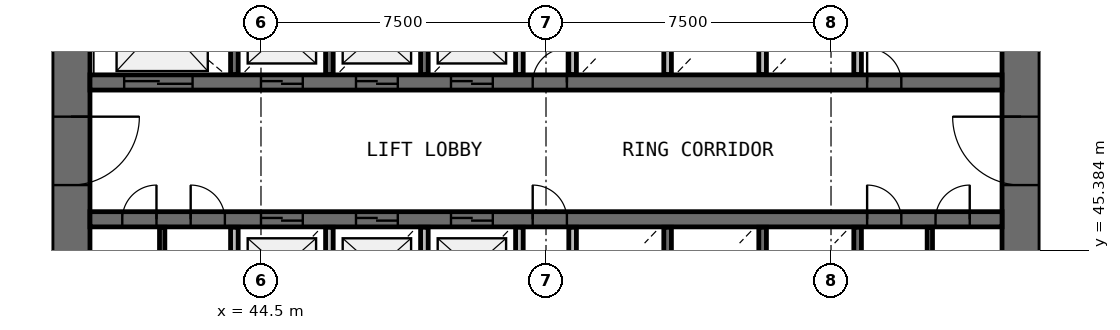
"""IFC4 building model, lengths in metres.
Left out: names, types, materials, properties, quantities, classifications, styles, units other than length and angle.
Written with IfcOpenShell. Run it as: python <this file> out.ifc"""

import sys

from ifc_helpers import new_model, si_unit, direction, frame, frame_2d, origin, place, context, subcontext, project, spatial, rectangle, extrude, source, transform, mapped, element, fill, save


model = new_model("IFC4")
c1 = context("Model", 3, precision=1e-05, world=origin(), true_north=direction((0.0, 1.0)))
c2 = subcontext(c1, "Body", "Model", "MODEL_VIEW")
j1 = project(units=[si_unit("LENGTHUNIT", "METRE"), si_unit("PLANEANGLEUNIT", "RADIAN")], contexts=[c1])
p1 = place(None, origin())
s1 = spatial("IfcSite", under=j1, at=p1, CompositionType="ELEMENT")
p2 = place(p1, origin())
s2 = spatial("IfcBuilding", under=s1, at=p2, CompositionType="ELEMENT")
p3 = place(p2, frame((0.0, 0.0, 31.4)))
s3 = spatial("IfcBuildingStorey", under=s2, at=p3, CompositionType="ELEMENT", Elevation=31.4)
p4 = place(p3, frame((64.5, 38.0, 0.0), z_axis=(0.0, 0.0, 1.0), x_axis=(0.0, 1.0, 0.0)))
e1 = element("IfcWall", 1, at=p4, inside=s3, PredefinedType="SHEAR", context=c2, shape_type="SweptSolid", body=[
    extrude(rectangle(XDim=20.0, YDim=1.0, at=frame_2d((10.0, 0.0))), origin(), (0.0, 0.0, 1.0), 4.4),
])
p5 = place(p4, frame((9.1, 0.0, 0.0)))
e2 = element("IfcOpeningElement", 2, at=p5, cuts=e1, PredefinedType="OPENING", context=c2, shape_type="SweptSolid", body=[
    extrude(rectangle(XDim=1.8, YDim=2.1, at=frame_2d((0.9, 1.05))), frame((0.0, 0.51, 0.0), z_axis=(0.0, -1.0, 0.0), x_axis=(1.0, 0.0, 0.0)), (0.0, 0.0, 1.0), 1.02),
])
p6 = place(p3, frame((39.5, 58.0, 0.0), z_axis=(0.0, 0.0, 1.0), x_axis=(0.0, -1.0, 0.0)))
e3 = element("IfcWall", 3, at=p6, inside=s3, PredefinedType="SHEAR", context=c2, shape_type="SweptSolid", body=[
    extrude(rectangle(XDim=20.0, YDim=1.0, at=frame_2d((10.0, 0.0))), origin(), (0.0, 0.0, 1.0), 4.4),
])
p7 = place(p6, frame((9.1, 0.0, 0.0)))
e4 = element("IfcOpeningElement", 4, at=p7, cuts=e3, PredefinedType="OPENING", context=c2, shape_type="SweptSolid", body=[
    extrude(rectangle(XDim=1.8, YDim=2.1, at=frame_2d((0.9, 1.05))), frame((0.0, 0.51, 0.0), z_axis=(0.0, -1.0, 0.0), x_axis=(1.0, 0.0, 0.0)), (0.0, 0.0, 1.0), 1.02),
])
p8 = place(p3, frame((40.0, 49.8, 0.0), z_axis=(0.0, 0.0, 1.0), x_axis=(1.0, 0.0, 0.0)))
e5 = element("IfcWall", 5, at=p8, inside=s3, PredefinedType="SHEAR", context=c2, shape_type="SweptSolid", body=[
    extrude(rectangle(XDim=24.0, YDim=0.4, at=frame_2d((12.0, 0.0))), origin(), (0.0, 0.0, 1.0), 4.4),
])
p9 = place(p8, frame((4.5, 0.0, 0.0)))
e6 = element("IfcOpeningElement", 6, at=p9, cuts=e5, PredefinedType="OPENING", context=c2, shape_type="SweptSolid", body=[
    extrude(rectangle(XDim=1.1, YDim=2.1, at=frame_2d((0.55, 1.05))), frame((0.0, 0.21, 0.0), z_axis=(0.0, -1.0, 0.0), x_axis=(1.0, 0.0, 0.0)), (0.0, 0.0, 1.0), 0.42),
])
p10 = place(p8, frame((7.0, 0.0, 0.0)))
e7 = element("IfcOpeningElement", 7, at=p10, cuts=e5, PredefinedType="OPENING", context=c2, shape_type="SweptSolid", body=[
    extrude(rectangle(XDim=1.1, YDim=2.1, at=frame_2d((0.55, 1.05))), frame((0.0, 0.21, 0.0), z_axis=(0.0, -1.0, 0.0), x_axis=(1.0, 0.0, 0.0)), (0.0, 0.0, 1.0), 0.42),
])
p11 = place(p8, frame((9.5, 0.0, 0.0)))
e8 = element("IfcOpeningElement", 8, at=p11, cuts=e5, PredefinedType="OPENING", context=c2, shape_type="SweptSolid", body=[
    extrude(rectangle(XDim=1.1, YDim=2.1, at=frame_2d((0.55, 1.05))), frame((0.0, 0.21, 0.0), z_axis=(0.0, -1.0, 0.0), x_axis=(1.0, 0.0, 0.0)), (0.0, 0.0, 1.0), 0.42),
])
p12 = place(p8, frame((0.9, 0.0, 0.0)))
e9 = element("IfcOpeningElement", 9, at=p12, cuts=e5, PredefinedType="OPENING", context=c2, shape_type="SweptSolid", body=[
    extrude(rectangle(XDim=1.8, YDim=2.4, at=frame_2d((0.9, 1.2))), frame((0.0, 0.21, 0.0), z_axis=(0.0, -1.0, 0.0), x_axis=(1.0, 0.0, 0.0)), (0.0, 0.0, 1.0), 0.42),
])
p13 = place(p8, frame((20.45, 0.0, 0.0)))
e10 = element("IfcOpeningElement", 10, at=p13, cuts=e5, PredefinedType="OPENING", context=c2, shape_type="SweptSolid", body=[
    extrude(rectangle(XDim=0.9, YDim=2.1, at=frame_2d((0.45, 1.05))), frame((0.0, 0.21, 0.0), z_axis=(0.0, -1.0, 0.0), x_axis=(1.0, 0.0, 0.0)), (0.0, 0.0, 1.0), 0.42),
])
p14 = place(p8, frame((11.65, 0.0, 0.0)))
e11 = element("IfcOpeningElement", 11, at=p14, cuts=e5, PredefinedType="OPENING", context=c2, shape_type="SweptSolid", body=[
    extrude(rectangle(XDim=0.9, YDim=2.1, at=frame_2d((0.45, 1.05))), frame((0.0, 0.21, 0.0), z_axis=(0.0, -1.0, 0.0), x_axis=(1.0, 0.0, 0.0)), (0.0, 0.0, 1.0), 0.42),
])
p15 = place(p3, frame((40.0, 46.2, 0.0), z_axis=(0.0, 0.0, 1.0), x_axis=(1.0, 0.0, 0.0)))
e12 = element("IfcWall", 12, at=p15, inside=s3, PredefinedType="SHEAR", context=c2, shape_type="SweptSolid", body=[
    extrude(rectangle(XDim=24.0, YDim=0.4, at=frame_2d((12.0, 0.0))), origin(), (0.0, 0.0, 1.0), 4.4),
])
p16 = place(p15, frame((4.5, 0.0, 0.0)))
e13 = element("IfcOpeningElement", 13, at=p16, cuts=e12, PredefinedType="OPENING", context=c2, shape_type="SweptSolid", body=[
    extrude(rectangle(XDim=1.1, YDim=2.1, at=frame_2d((0.55, 1.05))), frame((0.0, 0.21, 0.0), z_axis=(0.0, -1.0, 0.0), x_axis=(1.0, 0.0, 0.0)), (0.0, 0.0, 1.0), 0.42),
])
p17 = place(p15, frame((7.0, 0.0, 0.0)))
e14 = element("IfcOpeningElement", 14, at=p17, cuts=e12, PredefinedType="OPENING", context=c2, shape_type="SweptSolid", body=[
    extrude(rectangle(XDim=1.1, YDim=2.1, at=frame_2d((0.55, 1.05))), frame((0.0, 0.21, 0.0), z_axis=(0.0, -1.0, 0.0), x_axis=(1.0, 0.0, 0.0)), (0.0, 0.0, 1.0), 0.42),
])
p18 = place(p15, frame((9.5, 0.0, 0.0)))
e15 = element("IfcOpeningElement", 15, at=p18, cuts=e12, PredefinedType="OPENING", context=c2, shape_type="SweptSolid", body=[
    extrude(rectangle(XDim=1.1, YDim=2.1, at=frame_2d((0.55, 1.05))), frame((0.0, 0.21, 0.0), z_axis=(0.0, -1.0, 0.0), x_axis=(1.0, 0.0, 0.0)), (0.0, 0.0, 1.0), 0.42),
])
p19 = place(p15, frame((20.45, 0.0, 0.0)))
e16 = element("IfcOpeningElement", 16, at=p19, cuts=e12, PredefinedType="OPENING", context=c2, shape_type="SweptSolid", body=[
    extrude(rectangle(XDim=0.9, YDim=2.1, at=frame_2d((0.45, 1.05))), frame((0.0, 0.21, 0.0), z_axis=(0.0, -1.0, 0.0), x_axis=(1.0, 0.0, 0.0)), (0.0, 0.0, 1.0), 0.42),
])
p20 = place(p15, frame((22.25, 0.0, 0.0)))
e17 = element("IfcOpeningElement", 17, at=p20, cuts=e12, PredefinedType="OPENING", context=c2, shape_type="SweptSolid", body=[
    extrude(rectangle(XDim=0.9, YDim=2.1, at=frame_2d((0.45, 1.05))), frame((0.0, 0.21, 0.0), z_axis=(0.0, -1.0, 0.0), x_axis=(1.0, 0.0, 0.0)), (0.0, 0.0, 1.0), 0.42),
])
p21 = place(p15, frame((0.85, 0.0, 0.0)))
e18 = element("IfcOpeningElement", 18, at=p21, cuts=e12, PredefinedType="OPENING", context=c2, shape_type="SweptSolid", body=[
    extrude(rectangle(XDim=0.9, YDim=2.1, at=frame_2d((0.45, 1.05))), frame((0.0, 0.21, 0.0), z_axis=(0.0, -1.0, 0.0), x_axis=(1.0, 0.0, 0.0)), (0.0, 0.0, 1.0), 0.42),
])
p22 = place(p15, frame((2.65, 0.0, 0.0)))
e19 = element("IfcOpeningElement", 19, at=p22, cuts=e12, PredefinedType="OPENING", context=c2, shape_type="SweptSolid", body=[
    extrude(rectangle(XDim=0.9, YDim=2.1, at=frame_2d((0.45, 1.05))), frame((0.0, 0.21, 0.0), z_axis=(0.0, -1.0, 0.0), x_axis=(1.0, 0.0, 0.0)), (0.0, 0.0, 1.0), 0.42),
])
p23 = place(p15, frame((11.65, 0.0, 0.0)))
e20 = element("IfcOpeningElement", 20, at=p23, cuts=e12, PredefinedType="OPENING", context=c2, shape_type="SweptSolid", body=[
    extrude(rectangle(XDim=0.9, YDim=2.1, at=frame_2d((0.45, 1.05))), frame((0.0, 0.21, 0.0), z_axis=(0.0, -1.0, 0.0), x_axis=(1.0, 0.0, 0.0)), (0.0, 0.0, 1.0), 0.42),
])
for number, where, z_axis, x_axis in (
    (21, (43.8, 45.99, 0.0), (0.0, 0.0, 1.0), (0.0, -1.0, 0.0)),
    (22, (43.8, 52.37, 0.0), (0.0, 0.0, 1.0), (0.0, -1.0, 0.0)),
):
    element("IfcWall", number, at=place(p3, frame(where, z_axis=z_axis, x_axis=x_axis)), inside=s3, PredefinedType="SOLIDWALL", context=c2, shape_type="SweptSolid", body=[
        extrude(rectangle(XDim=2.36, YDim=0.2, at=frame_2d((1.18, 0.0))), origin(), (0.0, 0.0, 1.0), 3.95),
    ])
p24 = place(p3, frame((46.3, 43.6, 0.0), z_axis=(0.0, 0.0, 1.0), x_axis=(0.0, 1.0, 0.0)))
e23 = element("IfcWall", 23, at=p24, inside=s3, PredefinedType="SOLIDWALL", context=c2, shape_type="SweptSolid", body=[
    extrude(rectangle(XDim=2.39, YDim=0.2, at=frame_2d((1.195, 0.0))), origin(), (0.0, 0.0, 1.0), 3.95),
])
for number, where, z_axis, x_axis in (
    (24, (46.3, 50.01, 0.0), (0.0, 0.0, 1.0), (0.0, 1.0, 0.0)),
    (25, (48.8, 43.63, 0.0), (0.0, 0.0, 1.0), (0.0, 1.0, 0.0)),
    (26, (48.8, 50.01, 0.0), (0.0, 0.0, 1.0), (0.0, 1.0, 0.0)),
    (27, (51.3, 43.63, 0.0), (0.0, 0.0, 1.0), (0.0, 1.0, 0.0)),
):
    element("IfcWall", number, at=place(p3, frame(where, z_axis=z_axis, x_axis=x_axis)), inside=s3, PredefinedType="SOLIDWALL", context=c2, shape_type="SweptSolid", body=[
        extrude(rectangle(XDim=2.36, YDim=0.2, at=frame_2d((1.18, 0.0))), origin(), (0.0, 0.0, 1.0), 3.95),
    ])
for number, where, z_axis, x_axis in (
    (28, (51.3, 50.01, 0.0), (0.0, 0.0, 1.0), (0.0, 1.0, 0.0)),
    (29, (52.7, 45.99, 0.0), (0.0, 0.0, 1.0), (0.0, -1.0, 0.0)),
):
    element("IfcWall", number, at=place(p3, frame(where, z_axis=z_axis, x_axis=x_axis)), inside=s3, PredefinedType="SOLIDWALL", context=c2, shape_type="SweptSolid", body=[
        extrude(rectangle(XDim=2.39, YDim=0.2, at=frame_2d((1.195, 0.0))), origin(), (0.0, 0.0, 1.0), 3.95),
    ])
for number, where, z_axis, x_axis in (
    (30, (52.7, 52.37, 0.0), (0.0, 0.0, 1.0), (0.0, -1.0, 0.0)),
    (31, (55.2, 43.63, 0.0), (0.0, 0.0, 1.0), (0.0, 1.0, 0.0)),
    (32, (55.2, 50.01, 0.0), (0.0, 0.0, 1.0), (0.0, 1.0, 0.0)),
    (33, (57.7, 43.63, 0.0), (0.0, 0.0, 1.0), (0.0, 1.0, 0.0)),
):
    element("IfcWall", number, at=place(p3, frame(where, z_axis=z_axis, x_axis=x_axis)), inside=s3, PredefinedType="SOLIDWALL", context=c2, shape_type="SweptSolid", body=[
        extrude(rectangle(XDim=2.36, YDim=0.2, at=frame_2d((1.18, 0.0))), origin(), (0.0, 0.0, 1.0), 3.95),
    ])
p25 = place(p3, frame((57.7, 50.01, 0.0), z_axis=(0.0, 0.0, 1.0), x_axis=(0.0, 1.0, 0.0)))
e34 = element("IfcWall", 34, at=p25, inside=s3, PredefinedType="SOLIDWALL", context=c2, shape_type="SweptSolid", body=[
    extrude(rectangle(XDim=2.39, YDim=0.2, at=frame_2d((1.195, 0.0))), origin(), (0.0, 0.0, 1.0), 3.95),
])
for number, where, z_axis, x_axis in (
    (35, (60.2, 43.63, 0.0), (0.0, 0.0, 1.0), (0.0, 1.0, 0.0)),
    (36, (60.2, 50.01, 0.0), (0.0, 0.0, 1.0), (0.0, 1.0, 0.0)),
):
    element("IfcWall", number, at=place(p3, frame(where, z_axis=z_axis, x_axis=x_axis)), inside=s3, PredefinedType="SOLIDWALL", context=c2, shape_type="SweptSolid", body=[
        extrude(rectangle(XDim=2.36, YDim=0.2, at=frame_2d((1.18, 0.0))), origin(), (0.0, 0.0, 1.0), 3.95),
    ])
for number, where, z_axis, x_axis in (
    (37, (41.9, 43.6, 0.0), (0.0, 0.0, 1.0), (0.0, 1.0, 0.0)),
    (38, (62.1, 43.6, 0.0), (0.0, 0.0, 1.0), (0.0, 1.0, 0.0)),
):
    element("IfcWall", number, at=place(p3, frame(where, z_axis=z_axis, x_axis=x_axis)), inside=s3, PredefinedType="PARTITIONING", context=c2, shape_type="SweptSolid", body=[
        extrude(rectangle(XDim=2.39, YDim=0.14, at=frame_2d((1.195, 0.0))), origin(), (0.0, 0.0, 1.0), 3.05),
    ])
m1 = source(origin(), c2, "Body", "SweptSolid", [
    extrude(rectangle(XDim=1.8, YDim=2.1, at=frame_2d((0.9, 1.05))), frame((0.0, 0.025, 0.0), z_axis=(0.0, -1.0, 0.0), x_axis=(1.0, 0.0, 0.0)), (0.0, 0.0, 1.0), 0.05),
])
p26 = place(p7, origin())
e39 = element("IfcDoor", 39, at=p26, inside=s3, OperationType="SINGLE_SWING_LEFT", PredefinedType="DOOR", context=c2, shape_type="MappedRepresentation", body=[
    mapped(m1, transform((0.0, 0.0, 0.0), scale=1.0)),
])
fill(e4, e39)
p27 = place(p5, origin())
e40 = element("IfcDoor", 40, at=p27, inside=s3, OperationType="SINGLE_SWING_RIGHT", PredefinedType="DOOR", context=c2, shape_type="MappedRepresentation", body=[
    mapped(m1, transform((0.0, 0.0, 0.0), scale=1.0)),
])
fill(e2, e40)
m2 = source(origin(), c2, "Body", "SweptSolid", [
    extrude(rectangle(XDim=1.1, YDim=2.1, at=frame_2d((0.55, 1.05))), frame((0.0, 0.025, 0.0), z_axis=(0.0, -1.0, 0.0), x_axis=(1.0, 0.0, 0.0)), (0.0, 0.0, 1.0), 0.05),
])
p28 = place(p9, origin())
e41 = element("IfcDoor", 41, at=p28, inside=s3, OperationType="DOUBLE_DOOR_SLIDING", PredefinedType="USERDEFINED", context=c2, shape_type="MappedRepresentation", body=[
    mapped(m2, transform((0.0, 0.0, 0.0), scale=1.0)),
])
fill(e6, e41)
p29 = place(p10, origin())
e42 = element("IfcDoor", 42, at=p29, inside=s3, OperationType="DOUBLE_DOOR_SLIDING", PredefinedType="USERDEFINED", context=c2, shape_type="MappedRepresentation", body=[
    mapped(m2, transform((0.0, 0.0, 0.0), scale=1.0)),
])
fill(e7, e42)
p30 = place(p11, origin())
e43 = element("IfcDoor", 43, at=p30, inside=s3, OperationType="DOUBLE_DOOR_SLIDING", PredefinedType="USERDEFINED", context=c2, shape_type="MappedRepresentation", body=[
    mapped(m2, transform((0.0, 0.0, 0.0), scale=1.0)),
])
fill(e8, e43)
p31 = place(p16, origin())
e44 = element("IfcDoor", 44, at=p31, inside=s3, OperationType="DOUBLE_DOOR_SLIDING", PredefinedType="USERDEFINED", context=c2, shape_type="MappedRepresentation", body=[
    mapped(m2, transform((0.0, 0.0, 0.0), scale=1.0)),
])
fill(e13, e44)
p32 = place(p17, origin())
e45 = element("IfcDoor", 45, at=p32, inside=s3, OperationType="DOUBLE_DOOR_SLIDING", PredefinedType="USERDEFINED", context=c2, shape_type="MappedRepresentation", body=[
    mapped(m2, transform((0.0, 0.0, 0.0), scale=1.0)),
])
fill(e14, e45)
p33 = place(p18, origin())
e46 = element("IfcDoor", 46, at=p33, inside=s3, OperationType="DOUBLE_DOOR_SLIDING", PredefinedType="USERDEFINED", context=c2, shape_type="MappedRepresentation", body=[
    mapped(m2, transform((0.0, 0.0, 0.0), scale=1.0)),
])
fill(e15, e46)
m3 = source(origin(), c2, "Body", "SweptSolid", [
    extrude(rectangle(XDim=1.8, YDim=2.4, at=frame_2d((0.9, 1.2))), frame((0.0, 0.025, 0.0), z_axis=(0.0, -1.0, 0.0), x_axis=(1.0, 0.0, 0.0)), (0.0, 0.0, 1.0), 0.05),
])
p34 = place(p12, origin())
e47 = element("IfcDoor", 47, at=p34, inside=s3, OperationType="DOUBLE_DOOR_SLIDING", PredefinedType="USERDEFINED", context=c2, shape_type="MappedRepresentation", body=[
    mapped(m3, transform((0.0, 0.0, 0.0), scale=1.0)),
])
fill(e9, e47)
m4 = source(origin(), c2, "Body", "SweptSolid", [
    extrude(rectangle(XDim=0.9, YDim=2.1, at=frame_2d((0.45, 1.05))), frame((0.0, 0.025, 0.0), z_axis=(0.0, -1.0, 0.0), x_axis=(1.0, 0.0, 0.0)), (0.0, 0.0, 1.0), 0.05),
])
p35 = place(p19, origin())
e48 = element("IfcDoor", 48, at=p35, inside=s3, OperationType="SINGLE_SWING_LEFT", PredefinedType="DOOR", context=c2, shape_type="MappedRepresentation", body=[
    mapped(m4, transform((0.0, 0.0, 0.0), scale=1.0)),
])
fill(e16, e48)
p36 = place(p20, origin())
e49 = element("IfcDoor", 49, at=p36, inside=s3, OperationType="SINGLE_SWING_RIGHT", PredefinedType="DOOR", context=c2, shape_type="MappedRepresentation", body=[
    mapped(m4, transform((0.0, 0.0, 0.0), scale=1.0)),
])
fill(e17, e49)
p37 = place(p13, origin())
e50 = element("IfcDoor", 50, at=p37, inside=s3, OperationType="SINGLE_SWING_LEFT", PredefinedType="DOOR", context=c2, shape_type="MappedRepresentation", body=[
    mapped(m4, transform((0.0, 0.0, 0.0), scale=1.0)),
])
fill(e10, e50)
p38 = place(p21, origin())
e51 = element("IfcDoor", 51, at=p38, inside=s3, OperationType="SINGLE_SWING_RIGHT", PredefinedType="DOOR", context=c2, shape_type="MappedRepresentation", body=[
    mapped(m4, transform((0.0, 0.0, 0.0), scale=1.0)),
])
fill(e18, e51)
p39 = place(p22, origin())
e52 = element("IfcDoor", 52, at=p39, inside=s3, OperationType="SINGLE_SWING_LEFT", PredefinedType="DOOR", context=c2, shape_type="MappedRepresentation", body=[
    mapped(m4, transform((0.0, 0.0, 0.0), scale=1.0)),
])
fill(e19, e52)
p40 = place(p14, origin())
e53 = element("IfcDoor", 53, at=p40, inside=s3, OperationType="SINGLE_SWING_RIGHT", PredefinedType="DOOR", context=c2, shape_type="MappedRepresentation", body=[
    mapped(m4, transform((0.0, 0.0, 0.0), scale=1.0)),
])
fill(e11, e53)
p41 = place(p23, origin())
e54 = element("IfcDoor", 54, at=p41, inside=s3, OperationType="SINGLE_SWING_LEFT", PredefinedType="DOOR", context=c2, shape_type="MappedRepresentation", body=[
    mapped(m4, transform((0.0, 0.0, 0.0), scale=1.0)),
])
fill(e20, e54)
save(model, sys.argv[1])
